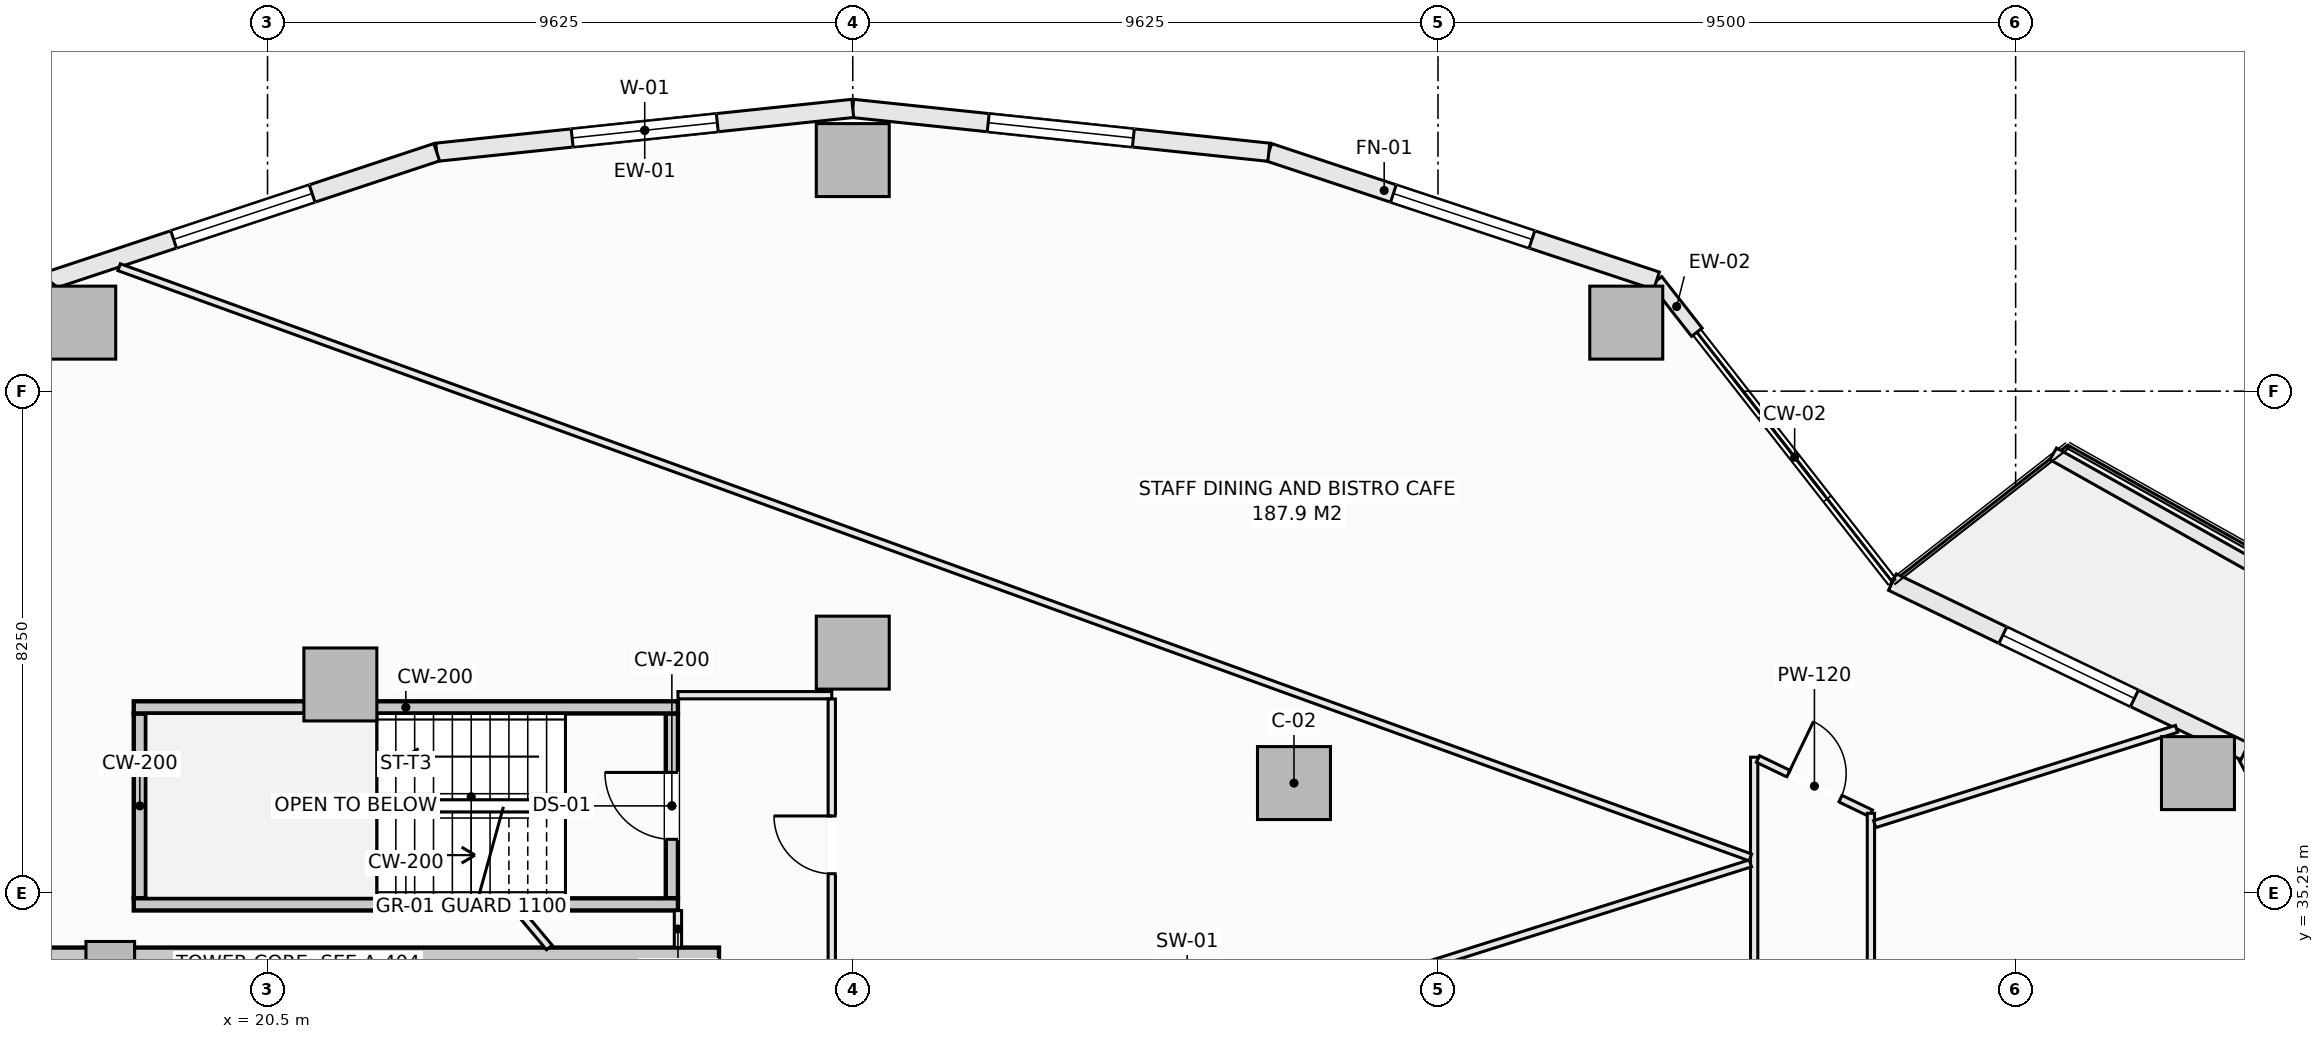
"""IFC4 building model, lengths in metres.
Left out: names, types, materials, properties, quantities, classifications, styles, units other than length and angle.
Written with IfcOpenShell. Run it as: python <this file> out.ifc"""

import sys

from ifc_helpers import new_model, si_unit, direction, frame, frame_2d, origin, origin_2d, place, context, subcontext, project, spatial, rectangle, extrude, element, fill, save


model = new_model("IFC4")
c1 = context("Model", 3, precision=1e-05, world=origin(), true_north=direction((0.0, 1.0)))
c2 = subcontext(c1, "Body", "Model", "MODEL_VIEW")
j1 = project(units=[si_unit("LENGTHUNIT", "METRE"), si_unit("PLANEANGLEUNIT", "RADIAN")], contexts=[c1])
p1 = place(None, origin())
s1 = spatial("IfcSite", under=j1, at=p1, CompositionType="ELEMENT")
p2 = place(p1, origin())
s2 = spatial("IfcBuilding", under=s1, at=p2, CompositionType="ELEMENT")
p3 = place(p2, frame((0.0, 0.0, 84.25)))
s3 = spatial("IfcBuildingStorey", under=s2, at=p3, CompositionType="ELEMENT", Elevation=84.25)
p4 = place(p3, frame((14.075, 33.925, -0.28), z_axis=(0.0, 0.0, 1.0), x_axis=(1.0, 0.0, 0.0)))
e1 = element("IfcWall", 1, at=p4, inside=s3, PredefinedType="SHEAR", context=c2, shape_type="SweptSolid", body=[
    extrude(rectangle(XDim=13.85, YDim=0.85, at=frame_2d((6.925, 0.0))), origin(), (0.0, 0.0, 1.0), 3.85),
])
for number, where, z_axis, x_axis in (
    (2, (52.249, 37.219, -0.28), (0.0, 0.0, 1.0), (1.0, 0.0, 0.0)),
    (3, (42.846, 44.627, -0.28), (0.0, 0.0, 1.0), (1.0, 0.0, 0.0)),
    (4, (30.125, 47.3, -0.28), (0.0, 0.0, 1.0), (1.0, 0.0, 0.0)),
    (5, (17.404, 44.627, -0.28), (0.0, 0.0, 1.0), (1.0, 0.0, 0.0)),
    (6, (37.382, 37.055, -0.28), (0.0, 0.0, 1.0), (1.0, 0.0, 0.0)),
    (7, (30.125, 39.2, -0.28), (0.0, 0.0, 1.0), (1.0, 0.0, 0.0)),
    (8, (21.698, 38.677, -0.28), (0.0, 0.0, 1.0), (1.0, 0.0, 0.0)),
):
    element("IfcColumn", number, at=place(p3, frame(where, z_axis=z_axis, x_axis=x_axis)), inside=s3, PredefinedType="COLUMN", context=c2, shape_type="SweptSolid", body=[
        extrude(rectangle(XDim=1.2, YDim=1.2, at=origin_2d()), origin(), (0.0, 0.0, 1.0), 3.85),
    ])
p5 = place(p3, frame((17.914, 34.05, -0.28), z_axis=(0.0, 0.0, 1.0), x_axis=(1.0, 0.0, 0.0)))
e9 = element("IfcColumn", 9, at=p5, inside=s3, PredefinedType="PILASTER", context=c2, shape_type="SweptSolid", body=[
    extrude(rectangle(XDim=0.8, YDim=0.8, at=origin_2d()), origin(), (0.0, 0.0, 1.0), 3.85),
])
p6 = place(p3, frame((53.021, 37.575, 0.0), z_axis=(0.0, 0.0, 1.0), x_axis=(0.459800981414, -0.888021991558, 0.0)))
e10 = element("IfcWall", 10, at=p6, inside=s3, PredefinedType="SOLIDWALL", context=c2, shape_type="SweptSolid", body=[
    extrude(rectangle(XDim=5.744, YDim=0.3, at=frame_2d((2.872, 0.0))), origin(), (0.0, 0.0, 1.0), 3.093),
])
p7 = place(p6, frame((1.972, 0.0, 0.0)))
e11 = element("IfcOpeningElement", 11, at=p7, cuts=e10, PredefinedType="OPENING", context=c2, shape_type="SweptSolid", body=[
    extrude(rectangle(XDim=1.8, YDim=2.25, at=frame_2d((0.9, 1.125))), frame((0.0, 0.16, 0.0), z_axis=(0.0, -1.0, 0.0), x_axis=(1.0, 0.0, 0.0)), (0.0, 0.0, 1.0), 0.32),
])
p8 = place(p3, frame((47.224, 40.36, 0.0), z_axis=(0.0, 0.0, 1.0), x_axis=(0.901354747727, -0.433081538224, 0.0)))
e12 = element("IfcWall", 12, at=p8, inside=s3, PredefinedType="SOLIDWALL", context=c2, shape_type="SweptSolid", body=[
    extrude(rectangle(XDim=6.431, YDim=0.3, at=frame_2d((3.215, 0.0))), origin(), (0.0, 0.0, 1.0), 3.093),
])
p9 = place(p8, frame((2.015, 0.0, 0.85)))
e13 = element("IfcOpeningElement", 13, at=p9, cuts=e12, PredefinedType="OPENING", context=c2, shape_type="SweptSolid", body=[
    extrude(rectangle(XDim=2.4, YDim=1.9, at=frame_2d((1.2, 0.95))), frame((0.0, 0.16, 0.0), z_axis=(0.0, -1.0, 0.0), x_axis=(1.0, 0.0, 0.0)), (0.0, 0.0, 1.0), 0.32),
])
p10 = place(p3, frame((43.344, 45.316, 0.0), z_axis=(0.0, 0.0, 1.0), x_axis=(0.616387780378, -0.787442762492, 0.0)))
e14 = element("IfcWall", 14, at=p10, inside=s3, PredefinedType="SOLIDWALL", context=c2, shape_type="SweptSolid", body=[
    extrude(rectangle(XDim=1.076, YDim=0.22, at=frame_2d((0.538, 0.0))), origin(), (0.0, 0.0, 1.0), 3.093),
])
p11 = place(p3, frame((36.968, 47.429, 0.0), z_axis=(0.0, 0.0, 1.0), x_axis=(0.949245153629, -0.314537181127, 0.0)))
e15 = element("IfcWall", 15, at=p11, inside=s3, PredefinedType="SOLIDWALL", context=c2, shape_type="SweptSolid", body=[
    extrude(rectangle(XDim=6.717, YDim=0.3, at=frame_2d((3.358, 0.0))), origin(), (0.0, 0.0, 1.0), 3.093),
])
p12 = place(p11, frame((2.159, 0.0, 0.85)))
e16 = element("IfcOpeningElement", 16, at=p12, cuts=e15, PredefinedType="OPENING", context=c2, shape_type="SweptSolid", body=[
    extrude(rectangle(XDim=2.4, YDim=1.9, at=frame_2d((1.2, 0.95))), frame((0.0, 0.16, 0.0), z_axis=(0.0, -1.0, 0.0), x_axis=(1.0, 0.0, 0.0)), (0.0, 0.0, 1.0), 0.32),
])
p13 = place(p3, frame((30.125, 48.15, 0.0), z_axis=(0.0, 0.0, 1.0), x_axis=(0.994498840295, -0.104747585419, 0.0)))
e17 = element("IfcWall", 17, at=p13, inside=s3, PredefinedType="SOLIDWALL", context=c2, shape_type="SweptSolid", body=[
    extrude(rectangle(XDim=6.88, YDim=0.3, at=frame_2d((3.44, 0.0))), origin(), (0.0, 0.0, 1.0), 3.093),
])
p14 = place(p13, frame((2.24, 0.0, 0.85)))
e18 = element("IfcOpeningElement", 18, at=p14, cuts=e17, PredefinedType="OPENING", context=c2, shape_type="SweptSolid", body=[
    extrude(rectangle(XDim=2.4, YDim=1.9, at=frame_2d((1.2, 0.95))), frame((0.0, 0.16, 0.0), z_axis=(0.0, -1.0, 0.0), x_axis=(1.0, 0.0, 0.0)), (0.0, 0.0, 1.0), 0.32),
])
p15 = place(p3, frame((23.282, 47.429, 0.0), z_axis=(0.0, 0.0, 1.0), x_axis=(0.994498840295, 0.104747585419, 0.0)))
e19 = element("IfcWall", 19, at=p15, inside=s3, PredefinedType="SOLIDWALL", context=c2, shape_type="SweptSolid", body=[
    extrude(rectangle(XDim=6.88, YDim=0.3, at=frame_2d((3.44, 0.0))), origin(), (0.0, 0.0, 1.0), 3.093),
])
p16 = place(p15, frame((2.24, 0.0, 0.85)))
e20 = element("IfcOpeningElement", 20, at=p16, cuts=e19, PredefinedType="OPENING", context=c2, shape_type="SweptSolid", body=[
    extrude(rectangle(XDim=2.4, YDim=1.9, at=frame_2d((1.2, 0.95))), frame((0.0, 0.16, 0.0), z_axis=(0.0, -1.0, 0.0), x_axis=(1.0, 0.0, 0.0)), (0.0, 0.0, 1.0), 0.32),
])
p17 = place(p3, frame((16.906, 45.316, 0.0), z_axis=(0.0, 0.0, 1.0), x_axis=(0.949245153629, 0.314537181127, 0.0)))
e21 = element("IfcWall", 21, at=p17, inside=s3, PredefinedType="SOLIDWALL", context=c2, shape_type="SweptSolid", body=[
    extrude(rectangle(XDim=6.717, YDim=0.3, at=frame_2d((3.358, 0.0))), origin(), (0.0, 0.0, 1.0), 3.093),
])
p18 = place(p17, frame((2.159, 0.0, 0.85)))
e22 = element("IfcOpeningElement", 22, at=p18, cuts=e21, PredefinedType="OPENING", context=c2, shape_type="SweptSolid", body=[
    extrude(rectangle(XDim=2.4, YDim=1.9, at=frame_2d((1.2, 0.95))), frame((0.0, 0.16, 0.0), z_axis=(0.0, -1.0, 0.0), x_axis=(1.0, 0.0, 0.0)), (0.0, 0.0, 1.0), 0.32),
])
p19 = place(p3, frame((16.243, 44.469, 0.0), z_axis=(0.0, 0.0, 1.0), x_axis=(0.616418327775, 0.787418849903, 0.0)))
e23 = element("IfcWall", 23, at=p19, inside=s3, PredefinedType="SOLIDWALL", context=c2, shape_type="SweptSolid", body=[
    extrude(rectangle(XDim=1.076, YDim=0.22, at=frame_2d((0.538, 0.0))), origin(), (0.0, 0.0, 1.0), 3.093),
])
p20 = place(p3, frame((49.868, 42.469, 0.0), z_axis=(0.0, 0.0, 1.0), x_axis=(0.871775109335, -0.489906275468, 0.0)))
e24 = element("IfcWall", 24, at=p20, inside=s3, PredefinedType="PARAPET", context=c2, shape_type="SweptSolid", body=[
    extrude(rectangle(XDim=7.152, YDim=0.22, at=frame_2d((3.576, 0.0))), origin(), (0.0, 0.0, 1.0), 0.52),
])
p21 = place(p3, frame((27.15, 35.16, -0.28), z_axis=(0.0, 0.0, 1.0), x_axis=(0.0, 1.0, 0.0)))
e25 = element("IfcWall", 25, at=p21, inside=s3, PredefinedType="SHEAR", context=c2, shape_type="SweptSolid", body=[
    extrude(rectangle(XDim=3.04, YDim=0.2, at=frame_2d((1.52, 0.0))), origin(), (0.0, 0.0, 1.0), 3.85),
])
p22 = place(p21, frame((0.97, 0.0, 0.28)))
e26 = element("IfcOpeningElement", 26, at=p22, cuts=e25, PredefinedType="OPENING", context=c2, shape_type="SweptSolid", body=[
    extrude(rectangle(XDim=1.1, YDim=2.15, at=frame_2d((0.55, 1.075))), frame((0.0, 0.11, 0.0), z_axis=(0.0, -1.0, 0.0), x_axis=(1.0, 0.0, 0.0)), (0.0, 0.0, 1.0), 0.22),
])
p23 = place(p3, frame((18.4, 35.16, -0.28), z_axis=(0.0, 0.0, 1.0), x_axis=(0.0, 1.0, 0.0)))
e27 = element("IfcWall", 27, at=p23, inside=s3, PredefinedType="SHEAR", context=c2, shape_type="SweptSolid", body=[
    extrude(rectangle(XDim=3.04, YDim=0.2, at=frame_2d((1.52, 0.0))), origin(), (0.0, 0.0, 1.0), 3.85),
])
for number, where, z_axis, x_axis in (
    (28, (18.3, 38.3, -0.28), (0.0, 0.0, 1.0), (1.0, 0.0, 0.0)),
    (29, (18.3, 35.06, -0.28), (0.0, 0.0, 1.0), (1.0, 0.0, 0.0)),
):
    element("IfcWall", number, at=place(p3, frame(where, z_axis=z_axis, x_axis=x_axis)), inside=s3, PredefinedType="SHEAR", context=c2, shape_type="SweptSolid", body=[
        extrude(rectangle(XDim=8.95, YDim=0.2, at=frame_2d((4.475, 0.0))), origin(), (0.0, 0.0, 1.0), 3.85),
    ])
p24 = place(p3, frame((27.25, 34.352, 0.0), z_axis=(0.0, 0.0, 1.0), x_axis=(0.0, 1.0, 0.0)))
e30 = element("IfcWall", 30, at=p24, inside=s3, PredefinedType="PARTITIONING", context=c2, shape_type="SweptSolid", body=[
    extrude(rectangle(XDim=0.606, YDim=0.12, at=frame_2d((0.303, 0.0))), origin(), (0.0, 0.0, 1.0), 3.57),
])
p25 = place(p3, frame((27.25, 38.5, 0.0), z_axis=(0.0, 0.0, 1.0), x_axis=(1.0, 0.0, 0.0)))
e31 = element("IfcWall", 31, at=p25, inside=s3, PredefinedType="PARTITIONING", context=c2, shape_type="SweptSolid", body=[
    extrude(rectangle(XDim=2.53, YDim=0.12, at=frame_2d((1.265, 0.0))), origin(), (0.0, 0.0, 1.0), 3.57),
])
p26 = place(p3, frame((29.78, 33.64, 0.0), z_axis=(0.0, 0.0, 1.0), x_axis=(0.0, 1.0, 0.0)))
e32 = element("IfcWall", 32, at=p26, inside=s3, PredefinedType="PARTITIONING", context=c2, shape_type="SweptSolid", body=[
    extrude(rectangle(XDim=4.798, YDim=0.12, at=frame_2d((2.399, 0.0))), origin(), (0.0, 0.0, 1.0), 3.57),
])
p27 = place(p26, frame((1.924, 0.0, 0.0)))
e33 = element("IfcOpeningElement", 33, at=p27, cuts=e32, PredefinedType="OPENING", context=c2, shape_type="SweptSolid", body=[
    extrude(rectangle(XDim=0.95, YDim=2.1, at=frame_2d((0.475, 1.05))), frame((0.0, 0.07, 0.0), z_axis=(0.0, -1.0, 0.0), x_axis=(1.0, 0.0, 0.0)), (0.0, 0.0, 1.0), 0.14),
])
p28 = place(p3, frame((44.95, 31.182, 0.0), z_axis=(0.0, 0.0, 1.0), x_axis=(0.0, 1.0, 0.0)))
e34 = element("IfcWall", 34, at=p28, inside=s3, PredefinedType="PARTITIONING", context=c2, shape_type="SweptSolid", body=[
    extrude(rectangle(XDim=6.299, YDim=0.12, at=frame_2d((3.149, 0.0))), origin(), (0.0, 0.0, 1.0), 3.57),
])
p29 = place(p3, frame((45.012, 37.451, 0.0), z_axis=(0.0, 0.0, 1.0), x_axis=(0.901304887575, -0.433185294803, 0.0)))
e35 = element("IfcWall", 35, at=p29, inside=s3, PredefinedType="PARTITIONING", context=c2, shape_type="SweptSolid", body=[
    extrude(rectangle(XDim=2.062, YDim=0.12, at=frame_2d((1.031, 0.0))), origin(), (0.0, 0.0, 1.0), 3.57),
])
p30 = place(p29, frame((0.556, 0.0, 0.0)))
e36 = element("IfcOpeningElement", 36, at=p30, cuts=e35, PredefinedType="OPENING", context=c2, shape_type="SweptSolid", body=[
    extrude(rectangle(XDim=0.95, YDim=2.1, at=frame_2d((0.475, 1.05))), frame((0.0, 0.07, 0.0), z_axis=(0.0, -1.0, 0.0), x_axis=(1.0, 0.0, 0.0)), (0.0, 0.0, 1.0), 0.14),
])
p31 = place(p3, frame((46.87, 17.442, 0.0), z_axis=(0.0, 0.0, 1.0), x_axis=(0.0, 1.0, 0.0)))
e37 = element("IfcWall", 37, at=p31, inside=s3, PredefinedType="PARTITIONING", context=c2, shape_type="SweptSolid", body=[
    extrude(rectangle(XDim=19.116, YDim=0.12, at=frame_2d((9.558, 0.0))), origin(), (0.0, 0.0, 1.0), 3.57),
])
p32 = place(p31, frame((11.352, 0.0, 0.0)))
e38 = element("IfcOpeningElement", 38, at=p32, cuts=e37, PredefinedType="OPENING", context=c2, shape_type="SweptSolid", body=[
    extrude(rectangle(XDim=0.95, YDim=2.1, at=frame_2d((0.475, 1.05))), frame((0.0, 0.07, 0.0), z_axis=(0.0, -1.0, 0.0), x_axis=(1.0, 0.0, 0.0)), (0.0, 0.0, 1.0), 0.14),
])
p33 = place(p3, frame((39.02, 33.883, 0.0), z_axis=(0.0, 0.0, 1.0), x_axis=(0.953639615223, 0.300950966568, 0.0)))
e39 = element("IfcWall", 39, at=p33, inside=s3, PredefinedType="PARTITIONING", context=c2, shape_type="SweptSolid", body=[
    extrude(rectangle(XDim=6.153, YDim=0.12, at=frame_2d((3.077, 0.0))), origin(), (0.0, 0.0, 1.0), 3.57),
])
p34 = place(p3, frame((46.932, 36.38, 0.0), z_axis=(0.0, 0.0, 1.0), x_axis=(0.9536443078, 0.300936096541, 0.0)))
e40 = element("IfcWall", 40, at=p34, inside=s3, PredefinedType="PARTITIONING", context=c2, shape_type="SweptSolid", body=[
    extrude(rectangle(XDim=5.206, YDim=0.12, at=frame_2d((2.603, 0.0))), origin(), (0.0, 0.0, 1.0), 3.57),
])
p35 = place(p3, frame((18.06, 45.538, 0.0), z_axis=(0.0, 0.0, 1.0), x_axis=(0.940354559933, -0.340195975304, 0.0)))
e41 = element("IfcWall", 41, at=p35, inside=s3, PredefinedType="PARTITIONING", context=c2, shape_type="SweptSolid", body=[
    extrude(rectangle(XDim=28.53, YDim=0.12, at=frame_2d((14.265, 0.0))), origin(), (0.0, 0.0, 1.0), 3.093),
])
p36 = place(p3, frame((24.626, 34.958, 0.0), z_axis=(0.0, 0.0, 1.0), x_axis=(0.643032873298, -0.765838575588, 0.0)))
e42 = element("IfcWall", 42, at=p36, inside=s3, PredefinedType="PARTITIONING", context=c2, shape_type="SweptSolid", body=[
    extrude(rectangle(XDim=0.791, YDim=0.12, at=frame_2d((0.396, 0.0))), origin(), (0.0, 0.0, 1.0), 3.57),
])
p37 = place(p9, origin())
e43 = element("IfcWindow", 43, at=p37, inside=s3, PartitioningType="SINGLE_PANEL", PredefinedType="WINDOW", context=c2, shape_type="SweptSolid", body=[
    extrude(rectangle(XDim=2.4, YDim=1.9, at=frame_2d((1.2, 0.95))), frame((0.0, 0.03, 0.0), z_axis=(0.0, -1.0, 0.0), x_axis=(1.0, 0.0, 0.0)), (0.0, 0.0, 1.0), 0.06),
])
fill(e13, e43)
p38 = place(p12, origin())
e44 = element("IfcWindow", 44, at=p38, inside=s3, PartitioningType="SINGLE_PANEL", PredefinedType="WINDOW", context=c2, shape_type="SweptSolid", body=[
    extrude(rectangle(XDim=2.4, YDim=1.9, at=frame_2d((1.2, 0.95))), frame((0.0, 0.03, 0.0), z_axis=(0.0, -1.0, 0.0), x_axis=(1.0, 0.0, 0.0)), (0.0, 0.0, 1.0), 0.06),
])
fill(e16, e44)
p39 = place(p14, origin())
e45 = element("IfcWindow", 45, at=p39, inside=s3, PartitioningType="SINGLE_PANEL", PredefinedType="WINDOW", context=c2, shape_type="SweptSolid", body=[
    extrude(rectangle(XDim=2.4, YDim=1.9, at=frame_2d((1.2, 0.95))), frame((0.0, 0.03, 0.0), z_axis=(0.0, -1.0, 0.0), x_axis=(1.0, 0.0, 0.0)), (0.0, 0.0, 1.0), 0.06),
])
fill(e18, e45)
p40 = place(p16, origin())
e46 = element("IfcWindow", 46, at=p40, inside=s3, PartitioningType="SINGLE_PANEL", PredefinedType="WINDOW", context=c2, shape_type="SweptSolid", body=[
    extrude(rectangle(XDim=2.4, YDim=1.9, at=frame_2d((1.2, 0.95))), frame((0.0, 0.03, 0.0), z_axis=(0.0, -1.0, 0.0), x_axis=(1.0, 0.0, 0.0)), (0.0, 0.0, 1.0), 0.06),
])
fill(e20, e46)
p41 = place(p18, origin())
e47 = element("IfcWindow", 47, at=p41, inside=s3, PartitioningType="SINGLE_PANEL", PredefinedType="WINDOW", context=c2, shape_type="SweptSolid", body=[
    extrude(rectangle(XDim=2.4, YDim=1.9, at=frame_2d((1.2, 0.95))), frame((0.0, 0.03, 0.0), z_axis=(0.0, -1.0, 0.0), x_axis=(1.0, 0.0, 0.0)), (0.0, 0.0, 1.0), 0.06),
])
fill(e22, e47)
p42 = place(p22, origin())
e48 = element("IfcDoor", 48, at=p42, inside=s3, OperationType="SINGLE_SWING_RIGHT", PredefinedType="DOOR", context=c2, shape_type="SweptSolid", body=[
    extrude(rectangle(XDim=1.1, YDim=2.15, at=frame_2d((0.55, 1.075))), frame((0.0, 0.025, 0.0), z_axis=(0.0, -1.0, 0.0), x_axis=(1.0, 0.0, 0.0)), (0.0, 0.0, 1.0), 0.05),
])
fill(e26, e48)
p43 = place(p30, origin())
e49 = element("IfcDoor", 49, at=p43, inside=s3, OperationType="SINGLE_SWING_LEFT", PredefinedType="DOOR", context=c2, shape_type="SweptSolid", body=[
    extrude(rectangle(XDim=0.95, YDim=2.1, at=frame_2d((0.475, 1.05))), frame((0.0, 0.025, 0.0), z_axis=(0.0, -1.0, 0.0), x_axis=(1.0, 0.0, 0.0)), (0.0, 0.0, 1.0), 0.05),
])
fill(e36, e49)
p44 = place(p27, origin())
e50 = element("IfcDoor", 50, at=p44, inside=s3, OperationType="SINGLE_SWING_RIGHT", PredefinedType="DOOR", context=c2, shape_type="SweptSolid", body=[
    extrude(rectangle(XDim=0.95, YDim=2.1, at=frame_2d((0.475, 1.05))), frame((0.0, 0.025, 0.0), z_axis=(0.0, -1.0, 0.0), x_axis=(1.0, 0.0, 0.0)), (0.0, 0.0, 1.0), 0.05),
])
fill(e33, e50)
save(model, sys.argv[1])
